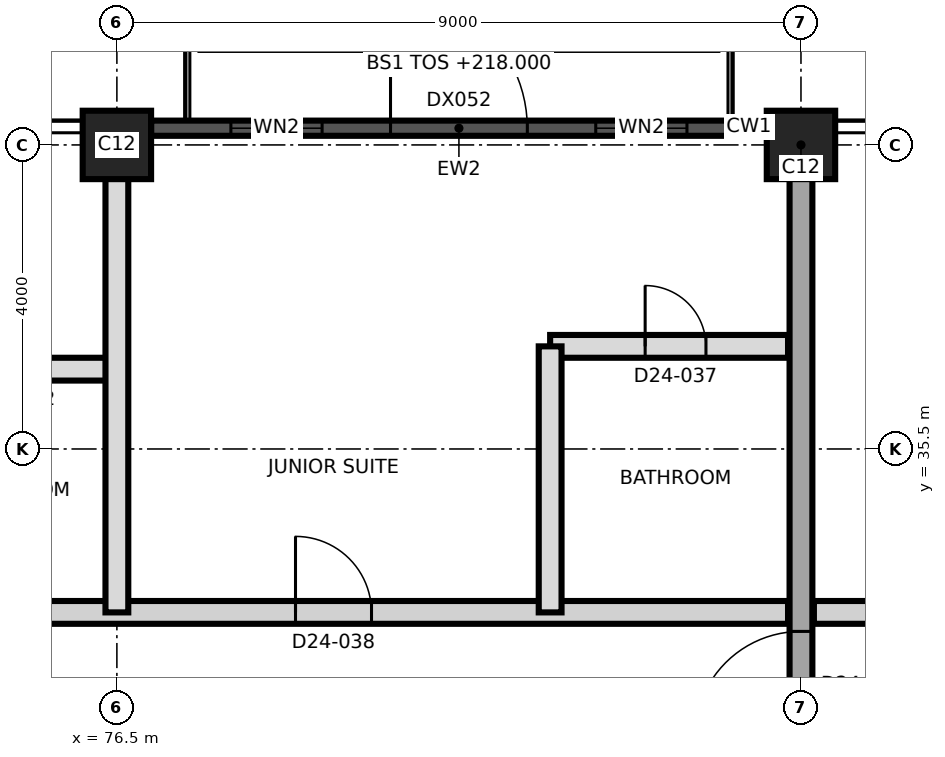
"""IFC4 building model, lengths in metres.
Left out: names, types, materials, properties, quantities, classifications, styles, units other than length and angle.
Written with IfcOpenShell. Run it as: python <this file> out.ifc"""

import sys

from ifc_helpers import new_model, si_unit, direction, frame, frame_2d, origin, origin_2d, place, context, subcontext, project, spatial, rectangle, extrude, element, fill, save


model = new_model("IFC4")
c1 = context("Model", 3, precision=1e-05, world=origin(), true_north=direction((0.0, 1.0)))
c2 = subcontext(c1, "Body", "Model", "MODEL_VIEW")
j1 = project(units=[si_unit("LENGTHUNIT", "METRE"), si_unit("PLANEANGLEUNIT", "RADIAN")], contexts=[c1])
p1 = place(None, origin())
s1 = spatial("IfcSite", under=j1, at=p1, CompositionType="ELEMENT")
p2 = place(p1, origin())
s2 = spatial("IfcBuilding", under=s1, at=p2, CompositionType="ELEMENT")
p3 = place(p2, frame((0.0, 0.0, 218.0)))
s3 = spatial("IfcBuildingStorey", under=s2, at=p3, CompositionType="ELEMENT", Elevation=218.0)
for number, where, z_axis, x_axis in (
    (1, (76.5, 39.5, 0.0), (0.0, 0.0, 1.0), (1.0, 0.0, 0.0)),
    (2, (85.5, 39.5, 0.0), (0.0, 0.0, 1.0), (1.0, 0.0, 0.0)),
):
    element("IfcColumn", number, at=place(p3, frame(where, z_axis=z_axis, x_axis=x_axis)), inside=s3, PredefinedType="COLUMN", context=c2, shape_type="SweptSolid", body=[
        extrude(rectangle(XDim=0.9, YDim=0.9, at=origin_2d()), origin(), (0.0, 0.0, 1.0), 3.7),
    ])
p4 = place(p3, frame((85.5, 21.53, 0.0), z_axis=(0.0, 0.0, 1.0), x_axis=(0.0, 1.0, 0.0)))
e3 = element("IfcWall", 3, at=p4, inside=s3, PredefinedType="SHEAR", context=c2, shape_type="SweptSolid", body=[
    extrude(rectangle(XDim=17.94, YDim=0.3, at=frame_2d((8.97, 0.0))), origin(), (0.0, 0.0, 1.0), 3.7),
])
p5 = place(p4, frame((10.17, 0.0, 0.0)))
e4 = element("IfcOpeningElement", 4, at=p5, cuts=e3, PredefinedType="OPENING", context=c2, shape_type="SweptSolid", body=[
    extrude(rectangle(XDim=1.4, YDim=2.1, at=frame_2d((0.7, 1.05))), frame((0.0, 0.16, 0.0), z_axis=(0.0, -1.0, 0.0), x_axis=(1.0, 0.0, 0.0)), (0.0, 0.0, 1.0), 0.32),
])
p6 = place(p3, frame((76.95, 39.72, 0.0), z_axis=(0.0, 0.0, 1.0), x_axis=(1.0, 0.0, 0.0)))
e5 = element("IfcWall", 5, at=p6, inside=s3, PredefinedType="SOLIDWALL", context=c2, shape_type="SweptSolid", body=[
    extrude(rectangle(XDim=8.1, YDim=0.2, at=frame_2d((4.05, 0.0))), origin(), (0.0, 0.0, 1.0), 3.4),
])
p7 = place(p6, frame((3.15, 0.0, 0.0)))
e6 = element("IfcOpeningElement", 6, at=p7, cuts=e5, PredefinedType="OPENING", context=c2, shape_type="SweptSolid", body=[
    extrude(rectangle(XDim=1.8, YDim=2.4, at=frame_2d((0.9, 1.2))), frame((0.0, 0.11, 0.0), z_axis=(0.0, -1.0, 0.0), x_axis=(1.0, 0.0, 0.0)), (0.0, 0.0, 1.0), 0.22),
])
p8 = place(p6, frame((5.85, 0.0, 0.9)))
e7 = element("IfcOpeningElement", 7, at=p8, cuts=e5, PredefinedType="OPENING", context=c2, shape_type="SweptSolid", body=[
    extrude(rectangle(XDim=1.2, YDim=2.1, at=frame_2d((0.6, 1.05))), frame((0.0, 0.11, 0.0), z_axis=(0.0, -1.0, 0.0), x_axis=(1.0, 0.0, 0.0)), (0.0, 0.0, 1.0), 0.22),
])
p9 = place(p6, frame((1.05, 0.0, 0.9)))
e8 = element("IfcOpeningElement", 8, at=p9, cuts=e5, PredefinedType="OPENING", context=c2, shape_type="SweptSolid", body=[
    extrude(rectangle(XDim=1.2, YDim=2.1, at=frame_2d((0.6, 1.05))), frame((0.0, 0.11, 0.0), z_axis=(0.0, -1.0, 0.0), x_axis=(1.0, 0.0, 0.0)), (0.0, 0.0, 1.0), 0.22),
])
p10 = place(p3, frame((58.55, 33.35, 0.0), z_axis=(0.0, 0.0, 1.0), x_axis=(1.0, 0.0, 0.0)))
e9 = element("IfcWall", 9, at=p10, inside=s3, PredefinedType="PARTITIONING", context=c2, shape_type="SweptSolid", body=[
    extrude(rectangle(XDim=26.78, YDim=0.3, at=frame_2d((13.39, 0.0))), origin(), (0.0, 0.0, 1.0), 3.4),
])
p11 = place(p10, frame((3.95, 0.0, 0.0)))
e10 = element("IfcOpeningElement", 10, at=p11, cuts=e9, PredefinedType="OPENING", context=c2, shape_type="SweptSolid", body=[
    extrude(rectangle(XDim=1.0, YDim=2.4, at=frame_2d((0.5, 1.2))), frame((0.0, 0.16, 0.0), z_axis=(0.0, -1.0, 0.0), x_axis=(1.0, 0.0, 0.0)), (0.0, 0.0, 1.0), 0.32),
])
p12 = place(p10, frame((12.05, 0.0, 0.0)))
e11 = element("IfcOpeningElement", 11, at=p12, cuts=e9, PredefinedType="OPENING", context=c2, shape_type="SweptSolid", body=[
    extrude(rectangle(XDim=1.0, YDim=2.1, at=frame_2d((0.5, 1.05))), frame((0.0, 0.16, 0.0), z_axis=(0.0, -1.0, 0.0), x_axis=(1.0, 0.0, 0.0)), (0.0, 0.0, 1.0), 0.32),
])
p13 = place(p10, frame((13.85, 0.0, 0.0)))
e12 = element("IfcOpeningElement", 12, at=p13, cuts=e9, PredefinedType="OPENING", context=c2, shape_type="SweptSolid", body=[
    extrude(rectangle(XDim=1.0, YDim=2.1, at=frame_2d((0.5, 1.05))), frame((0.0, 0.16, 0.0), z_axis=(0.0, -1.0, 0.0), x_axis=(1.0, 0.0, 0.0)), (0.0, 0.0, 1.0), 0.32),
])
p14 = place(p10, frame((20.3, 0.0, 0.0)))
e13 = element("IfcOpeningElement", 13, at=p14, cuts=e9, PredefinedType="OPENING", context=c2, shape_type="SweptSolid", body=[
    extrude(rectangle(XDim=1.0, YDim=2.4, at=frame_2d((0.5, 1.2))), frame((0.0, 0.16, 0.0), z_axis=(0.0, -1.0, 0.0), x_axis=(1.0, 0.0, 0.0)), (0.0, 0.0, 1.0), 0.32),
])
p15 = place(p3, frame((85.67, 33.35, 0.0), z_axis=(0.0, 0.0, 1.0), x_axis=(1.0, 0.0, 0.0)))
e14 = element("IfcWall", 14, at=p15, inside=s3, PredefinedType="PARTITIONING", context=c2, shape_type="SweptSolid", body=[
    extrude(rectangle(XDim=8.685, YDim=0.3, at=frame_2d((4.343, 0.0))), origin(), (0.0, 0.0, 1.0), 3.4),
])
p16 = place(p15, frame((1.83, 0.0, 0.0)))
e15 = element("IfcOpeningElement", 15, at=p16, cuts=e14, PredefinedType="OPENING", context=c2, shape_type="SweptSolid", body=[
    extrude(rectangle(XDim=1.0, YDim=2.1, at=frame_2d((0.5, 1.05))), frame((0.0, 0.16, 0.0), z_axis=(0.0, -1.0, 0.0), x_axis=(1.0, 0.0, 0.0)), (0.0, 0.0, 1.0), 0.32),
])
p17 = place(p15, frame((5.63, 0.0, 0.0)))
e16 = element("IfcOpeningElement", 16, at=p17, cuts=e14, PredefinedType="OPENING", context=c2, shape_type="SweptSolid", body=[
    extrude(rectangle(XDim=1.0, YDim=2.1, at=frame_2d((0.5, 1.05))), frame((0.0, 0.16, 0.0), z_axis=(0.0, -1.0, 0.0), x_axis=(1.0, 0.0, 0.0)), (0.0, 0.0, 1.0), 0.32),
])
p18 = place(p3, frame((73.8, 36.55, 0.0), z_axis=(0.0, 0.0, 1.0), x_axis=(1.0, 0.0, 0.0)))
e17 = element("IfcWall", 17, at=p18, inside=s3, PredefinedType="PARTITIONING", context=c2, shape_type="SweptSolid", body=[
    extrude(rectangle(XDim=2.7, YDim=0.3, at=frame_2d((1.35, 0.0))), origin(), (0.0, 0.0, 1.0), 3.4),
])
p19 = place(p18, frame((0.95, 0.0, 0.0)))
e18 = element("IfcOpeningElement", 18, at=p19, cuts=e17, PredefinedType="OPENING", context=c2, shape_type="SweptSolid", body=[
    extrude(rectangle(XDim=0.8, YDim=2.1, at=frame_2d((0.4, 1.05))), frame((0.0, 0.16, 0.0), z_axis=(0.0, -1.0, 0.0), x_axis=(1.0, 0.0, 0.0)), (0.0, 0.0, 1.0), 0.32),
])
p20 = place(p3, frame((82.2, 36.85, 0.0), z_axis=(0.0, 0.0, 1.0), x_axis=(1.0, 0.0, 0.0)))
e19 = element("IfcWall", 19, at=p20, inside=s3, PredefinedType="PARTITIONING", context=c2, shape_type="SweptSolid", body=[
    extrude(rectangle(XDim=3.13, YDim=0.3, at=frame_2d((1.565, 0.0))), origin(), (0.0, 0.0, 1.0), 3.4),
])
p21 = place(p20, frame((1.25, 0.0, 0.0)))
e20 = element("IfcOpeningElement", 20, at=p21, cuts=e19, PredefinedType="OPENING", context=c2, shape_type="SweptSolid", body=[
    extrude(rectangle(XDim=0.8, YDim=2.1, at=frame_2d((0.4, 1.05))), frame((0.0, 0.16, 0.0), z_axis=(0.0, -1.0, 0.0), x_axis=(1.0, 0.0, 0.0)), (0.0, 0.0, 1.0), 0.32),
])
p22 = place(p3, frame((76.5, 33.35, 0.0), z_axis=(0.0, 0.0, 1.0), x_axis=(0.0, 1.0, 0.0)))
e21 = element("IfcWall", 21, at=p22, inside=s3, PredefinedType="PARTITIONING", context=c2, shape_type="SweptSolid", body=[
    extrude(rectangle(XDim=6.12, YDim=0.3, at=frame_2d((3.06, 0.0))), origin(), (0.0, 0.0, 1.0), 3.4),
])
p23 = place(p3, frame((82.2, 33.35, 0.0), z_axis=(0.0, 0.0, 1.0), x_axis=(0.0, 1.0, 0.0)))
e22 = element("IfcWall", 22, at=p23, inside=s3, PredefinedType="PARTITIONING", context=c2, shape_type="SweptSolid", body=[
    extrude(rectangle(XDim=3.5, YDim=0.3, at=frame_2d((1.75, 0.0))), origin(), (0.0, 0.0, 1.0), 3.4),
])
p24 = place(p7, origin())
e23 = element("IfcDoor", 23, at=p24, inside=s3, OperationType="SINGLE_SWING_LEFT", PredefinedType="DOOR", context=c2, shape_type="SweptSolid", body=[
    extrude(rectangle(XDim=1.8, YDim=2.4, at=frame_2d((0.9, 1.2))), frame((0.0, 0.025, 0.0), z_axis=(0.0, -1.0, 0.0), x_axis=(1.0, 0.0, 0.0)), (0.0, 0.0, 1.0), 0.05),
])
fill(e6, e23)
p25 = place(p8, origin())
e24 = element("IfcWindow", 24, at=p25, inside=s3, PartitioningType="SINGLE_PANEL", PredefinedType="WINDOW", context=c2, shape_type="SweptSolid", body=[
    extrude(rectangle(XDim=1.2, YDim=2.1, at=frame_2d((0.6, 1.05))), frame((0.0, 0.03, 0.0), z_axis=(0.0, -1.0, 0.0), x_axis=(1.0, 0.0, 0.0)), (0.0, 0.0, 1.0), 0.06),
])
fill(e7, e24)
p26 = place(p9, origin())
e25 = element("IfcWindow", 25, at=p26, inside=s3, PartitioningType="SINGLE_PANEL", PredefinedType="WINDOW", context=c2, shape_type="SweptSolid", body=[
    extrude(rectangle(XDim=1.2, YDim=2.1, at=frame_2d((0.6, 1.05))), frame((0.0, 0.03, 0.0), z_axis=(0.0, -1.0, 0.0), x_axis=(1.0, 0.0, 0.0)), (0.0, 0.0, 1.0), 0.06),
])
fill(e8, e25)
p27 = place(p21, origin())
e26 = element("IfcDoor", 26, at=p27, inside=s3, OperationType="SINGLE_SWING_LEFT", PredefinedType="DOOR", context=c2, shape_type="SweptSolid", body=[
    extrude(rectangle(XDim=0.8, YDim=2.1, at=frame_2d((0.4, 1.05))), frame((0.0, 0.025, 0.0), z_axis=(0.0, -1.0, 0.0), x_axis=(1.0, 0.0, 0.0)), (0.0, 0.0, 1.0), 0.05),
])
fill(e20, e26)
p28 = place(p14, origin())
e27 = element("IfcDoor", 27, at=p28, inside=s3, OperationType="SINGLE_SWING_LEFT", PredefinedType="DOOR", context=c2, shape_type="SweptSolid", body=[
    extrude(rectangle(XDim=1.0, YDim=2.4, at=frame_2d((0.5, 1.2))), frame((0.0, 0.025, 0.0), z_axis=(0.0, -1.0, 0.0), x_axis=(1.0, 0.0, 0.0)), (0.0, 0.0, 1.0), 0.05),
])
fill(e13, e27)
p29 = place(p5, origin())
e28 = element("IfcDoor", 28, at=p29, inside=s3, OperationType="SINGLE_SWING_RIGHT", PredefinedType="DOOR", context=c2, shape_type="SweptSolid", body=[
    extrude(rectangle(XDim=1.4, YDim=2.1, at=frame_2d((0.7, 1.05))), frame((0.0, 0.025, 0.0), z_axis=(0.0, -1.0, 0.0), x_axis=(1.0, 0.0, 0.0)), (0.0, 0.0, 1.0), 0.05),
])
fill(e4, e28)
save(model, sys.argv[1])
